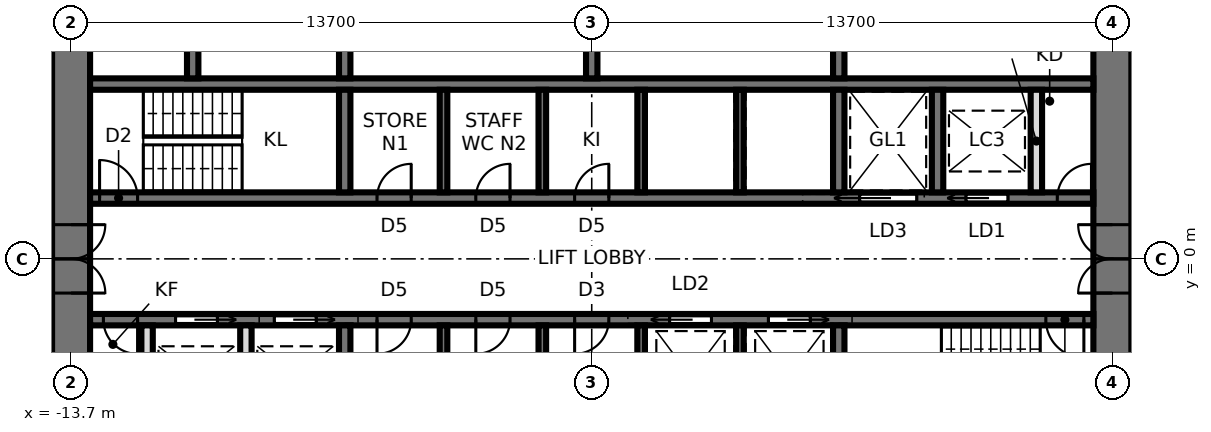
"""IFC4 building model, lengths in metres.
Left out: names, types, materials, properties, quantities, classifications, styles, units other than length and angle.
Written with IfcOpenShell. Run it as: python <this file> out.ifc"""

import sys

from ifc_helpers import new_model, si_unit, direction, frame, frame_2d, origin, place, context, subcontext, project, spatial, rectangle, extrude, element, fill, save


model = new_model("IFC4")
c1 = context("Model", 3, precision=1e-05, world=origin(), true_north=direction((0.0, 1.0)))
c2 = subcontext(c1, "Body", "Model", "MODEL_VIEW")
j1 = project(units=[si_unit("LENGTHUNIT", "METRE"), si_unit("PLANEANGLEUNIT", "RADIAN")], contexts=[c1])
p1 = place(None, origin())
s1 = spatial("IfcSite", under=j1, at=p1, CompositionType="ELEMENT")
p2 = place(p1, origin())
s2 = spatial("IfcBuilding", under=s1, at=p2, CompositionType="ELEMENT")
p3 = place(p2, frame((0.0, 0.0, 234.5)))
s3 = spatial("IfcBuildingStorey", under=s2, at=p3, CompositionType="ELEMENT", Elevation=234.5)
p4 = place(p3, frame((13.7, -9.5, 0.0), z_axis=(0.0, 0.0, 1.0), x_axis=(0.0, 1.0, 0.0)))
e1 = element("IfcWall", 1, at=p4, inside=s3, PredefinedType="SHEAR", context=c2, shape_type="SweptSolid", body=[
    extrude(rectangle(XDim=19.0, YDim=1.0, at=frame_2d((9.5, 0.0))), origin(), (0.0, 0.0, 1.0), 3.9),
])
p5 = place(p4, frame((8.6, 0.0, 0.0)))
e2 = element("IfcOpeningElement", 2, at=p5, cuts=e1, PredefinedType="OPENING", context=c2, shape_type="SweptSolid", body=[
    extrude(rectangle(XDim=1.8, YDim=2.4, at=frame_2d((0.9, 1.2))), frame((0.0, 0.51, 0.0), z_axis=(0.0, -1.0, 0.0), x_axis=(1.0, 0.0, 0.0)), (0.0, 0.0, 1.0), 1.02),
])
p6 = place(p3, frame((-13.7, 9.5, 0.0), z_axis=(0.0, 0.0, 1.0), x_axis=(0.0, -1.0, 0.0)))
e3 = element("IfcWall", 3, at=p6, inside=s3, PredefinedType="SHEAR", context=c2, shape_type="SweptSolid", body=[
    extrude(rectangle(XDim=19.0, YDim=1.0, at=frame_2d((9.5, 0.0))), origin(), (0.0, 0.0, 1.0), 3.9),
])
p7 = place(p6, frame((8.6, 0.0, 0.0)))
e4 = element("IfcOpeningElement", 4, at=p7, cuts=e3, PredefinedType="OPENING", context=c2, shape_type="SweptSolid", body=[
    extrude(rectangle(XDim=1.8, YDim=2.4, at=frame_2d((0.9, 1.2))), frame((0.0, 0.51, 0.0), z_axis=(0.0, -1.0, 0.0), x_axis=(1.0, 0.0, 0.0)), (0.0, 0.0, 1.0), 1.02),
])
p8 = place(p3, frame((-13.2, 1.6, 0.0), z_axis=(0.0, 0.0, 1.0), x_axis=(1.0, 0.0, 0.0)))
e5 = element("IfcWall", 5, at=p8, inside=s3, PredefinedType="SHEAR", context=c2, shape_type="SweptSolid", body=[
    extrude(rectangle(XDim=26.4, YDim=0.3, at=frame_2d((13.2, 0.0))), origin(), (0.0, 0.0, 1.0), 3.9),
])
p9 = place(p8, frame((0.25, 0.0, 0.0)))
e6 = element("IfcOpeningElement", 6, at=p9, cuts=e5, PredefinedType="OPENING", context=c2, shape_type="SweptSolid", body=[
    extrude(rectangle(XDim=1.0, YDim=2.1, at=frame_2d((0.5, 1.05))), frame((0.0, 0.16, 0.0), z_axis=(0.0, -1.0, 0.0), x_axis=(1.0, 0.0, 0.0)), (0.0, 0.0, 1.0), 0.32),
])
p10 = place(p8, frame((23.05, 0.0, 0.0)))
e7 = element("IfcOpeningElement", 7, at=p10, cuts=e5, PredefinedType="OPENING", context=c2, shape_type="SweptSolid", body=[
    extrude(rectangle(XDim=1.1, YDim=2.3, at=frame_2d((0.55, 1.15))), frame((0.0, 0.16, 0.0), z_axis=(0.0, -1.0, 0.0), x_axis=(1.0, 0.0, 0.0)), (0.0, 0.0, 1.0), 0.32),
])
p11 = place(p8, frame((20.25, 0.0, 0.0)))
e8 = element("IfcOpeningElement", 8, at=p11, cuts=e5, PredefinedType="OPENING", context=c2, shape_type="SweptSolid", body=[
    extrude(rectangle(XDim=1.5, YDim=2.4, at=frame_2d((0.75, 1.2))), frame((0.0, 0.16, 0.0), z_axis=(0.0, -1.0, 0.0), x_axis=(1.0, 0.0, 0.0)), (0.0, 0.0, 1.0), 0.32),
])
p12 = place(p8, frame((7.55, 0.0, 0.0)))
e9 = element("IfcOpeningElement", 9, at=p12, cuts=e5, PredefinedType="OPENING", context=c2, shape_type="SweptSolid", body=[
    extrude(rectangle(XDim=0.9, YDim=2.1, at=frame_2d((0.45, 1.05))), frame((0.0, 0.16, 0.0), z_axis=(0.0, -1.0, 0.0), x_axis=(1.0, 0.0, 0.0)), (0.0, 0.0, 1.0), 0.32),
])
p13 = place(p8, frame((10.15, 0.0, 0.0)))
e10 = element("IfcOpeningElement", 10, at=p13, cuts=e5, PredefinedType="OPENING", context=c2, shape_type="SweptSolid", body=[
    extrude(rectangle(XDim=0.9, YDim=2.1, at=frame_2d((0.45, 1.05))), frame((0.0, 0.16, 0.0), z_axis=(0.0, -1.0, 0.0), x_axis=(1.0, 0.0, 0.0)), (0.0, 0.0, 1.0), 0.32),
])
p14 = place(p8, frame((12.75, 0.0, 0.0)))
e11 = element("IfcOpeningElement", 11, at=p14, cuts=e5, PredefinedType="OPENING", context=c2, shape_type="SweptSolid", body=[
    extrude(rectangle(XDim=0.9, YDim=2.1, at=frame_2d((0.45, 1.05))), frame((0.0, 0.16, 0.0), z_axis=(0.0, -1.0, 0.0), x_axis=(1.0, 0.0, 0.0)), (0.0, 0.0, 1.0), 0.32),
])
p15 = place(p8, frame((25.45, 0.0, 0.0)))
e12 = element("IfcOpeningElement", 12, at=p15, cuts=e5, PredefinedType="OPENING", context=c2, shape_type="SweptSolid", body=[
    extrude(rectangle(XDim=0.9, YDim=2.1, at=frame_2d((0.45, 1.05))), frame((0.0, 0.16, 0.0), z_axis=(0.0, -1.0, 0.0), x_axis=(1.0, 0.0, 0.0)), (0.0, 0.0, 1.0), 0.32),
])
p16 = place(p3, frame((-13.2, -1.6, 0.0), z_axis=(0.0, 0.0, 1.0), x_axis=(1.0, 0.0, 0.0)))
e13 = element("IfcWall", 13, at=p16, inside=s3, PredefinedType="SHEAR", context=c2, shape_type="SweptSolid", body=[
    extrude(rectangle(XDim=26.4, YDim=0.3, at=frame_2d((13.2, 0.0))), origin(), (0.0, 0.0, 1.0), 3.9),
])
p17 = place(p16, frame((25.15, 0.0, 0.0)))
e14 = element("IfcOpeningElement", 14, at=p17, cuts=e13, PredefinedType="OPENING", context=c2, shape_type="SweptSolid", body=[
    extrude(rectangle(XDim=1.0, YDim=2.1, at=frame_2d((0.5, 1.05))), frame((0.0, 0.16, 0.0), z_axis=(0.0, -1.0, 0.0), x_axis=(1.0, 0.0, 0.0)), (0.0, 0.0, 1.0), 0.32),
])
p18 = place(p16, frame((7.55, 0.0, 0.0)))
e15 = element("IfcOpeningElement", 15, at=p18, cuts=e13, PredefinedType="OPENING", context=c2, shape_type="SweptSolid", body=[
    extrude(rectangle(XDim=0.9, YDim=2.1, at=frame_2d((0.45, 1.05))), frame((0.0, 0.16, 0.0), z_axis=(0.0, -1.0, 0.0), x_axis=(1.0, 0.0, 0.0)), (0.0, 0.0, 1.0), 0.32),
])
p19 = place(p16, frame((10.15, 0.0, 0.0)))
e16 = element("IfcOpeningElement", 16, at=p19, cuts=e13, PredefinedType="OPENING", context=c2, shape_type="SweptSolid", body=[
    extrude(rectangle(XDim=0.9, YDim=2.1, at=frame_2d((0.45, 1.05))), frame((0.0, 0.16, 0.0), z_axis=(0.0, -1.0, 0.0), x_axis=(1.0, 0.0, 0.0)), (0.0, 0.0, 1.0), 0.32),
])
p20 = place(p16, frame((12.75, 0.0, 0.0)))
e17 = element("IfcOpeningElement", 17, at=p20, cuts=e13, PredefinedType="OPENING", context=c2, shape_type="SweptSolid", body=[
    extrude(rectangle(XDim=0.9, YDim=2.1, at=frame_2d((0.45, 1.05))), frame((0.0, 0.16, 0.0), z_axis=(0.0, -1.0, 0.0), x_axis=(1.0, 0.0, 0.0)), (0.0, 0.0, 1.0), 0.32),
])
p21 = place(p16, frame((15.25, 0.0, 0.0)))
e18 = element("IfcOpeningElement", 18, at=p21, cuts=e13, PredefinedType="OPENING", context=c2, shape_type="SweptSolid", body=[
    extrude(rectangle(XDim=1.1, YDim=2.3, at=frame_2d((0.55, 1.15))), frame((0.0, 0.16, 0.0), z_axis=(0.0, -1.0, 0.0), x_axis=(1.0, 0.0, 0.0)), (0.0, 0.0, 1.0), 0.32),
])
p22 = place(p16, frame((17.85, 0.0, 0.0)))
e19 = element("IfcOpeningElement", 19, at=p22, cuts=e13, PredefinedType="OPENING", context=c2, shape_type="SweptSolid", body=[
    extrude(rectangle(XDim=1.1, YDim=2.3, at=frame_2d((0.55, 1.15))), frame((0.0, 0.16, 0.0), z_axis=(0.0, -1.0, 0.0), x_axis=(1.0, 0.0, 0.0)), (0.0, 0.0, 1.0), 0.32),
])
p23 = place(p16, frame((4.85, 0.0, 0.0)))
e20 = element("IfcOpeningElement", 20, at=p23, cuts=e13, PredefinedType="OPENING", context=c2, shape_type="SweptSolid", body=[
    extrude(rectangle(XDim=1.1, YDim=2.3, at=frame_2d((0.55, 1.15))), frame((0.0, 0.16, 0.0), z_axis=(0.0, -1.0, 0.0), x_axis=(1.0, 0.0, 0.0)), (0.0, 0.0, 1.0), 0.32),
])
p24 = place(p16, frame((2.25, 0.0, 0.0)))
e21 = element("IfcOpeningElement", 21, at=p24, cuts=e13, PredefinedType="OPENING", context=c2, shape_type="SweptSolid", body=[
    extrude(rectangle(XDim=1.1, YDim=2.3, at=frame_2d((0.55, 1.15))), frame((0.0, 0.16, 0.0), z_axis=(0.0, -1.0, 0.0), x_axis=(1.0, 0.0, 0.0)), (0.0, 0.0, 1.0), 0.32),
])
p25 = place(p16, frame((0.35, 0.0, 0.0)))
e22 = element("IfcOpeningElement", 22, at=p25, cuts=e13, PredefinedType="OPENING", context=c2, shape_type="SweptSolid", body=[
    extrude(rectangle(XDim=0.9, YDim=2.1, at=frame_2d((0.45, 1.05))), frame((0.0, 0.16, 0.0), z_axis=(0.0, -1.0, 0.0), x_axis=(1.0, 0.0, 0.0)), (0.0, 0.0, 1.0), 0.32),
])
p26 = place(p3, frame((-13.2, 4.6, 0.0), z_axis=(0.0, 0.0, 1.0), x_axis=(1.0, 0.0, 0.0)))
e23 = element("IfcWall", 23, at=p26, inside=s3, PredefinedType="SHEAR", context=c2, shape_type="SweptSolid", body=[
    extrude(rectangle(XDim=26.4, YDim=0.3, at=frame_2d((13.2, 0.0))), origin(), (0.0, 0.0, 1.0), 3.9),
])
p27 = place(p3, frame((-6.5, 1.75, 0.0), z_axis=(0.0, 0.0, 1.0), x_axis=(0.0, 1.0, 0.0)))
e24 = element("IfcWall", 24, at=p27, inside=s3, PredefinedType="SHEAR", context=c2, shape_type="SweptSolid", body=[
    extrude(rectangle(XDim=2.7, YDim=0.3, at=frame_2d((1.35, 0.0))), origin(), (0.0, 0.0, 1.0), 3.9),
])
p28 = place(p3, frame((-6.5, 4.75, 0.0), z_axis=(0.0, 0.0, 1.0), x_axis=(0.0, 1.0, 0.0)))
e25 = element("IfcWall", 25, at=p28, inside=s3, PredefinedType="SHEAR", context=c2, shape_type="SweptSolid", body=[
    extrude(rectangle(XDim=3.75, YDim=0.3, at=frame_2d((1.875, 0.0))), origin(), (0.0, 0.0, 1.0), 3.9),
])
p29 = place(p3, frame((6.5, 1.75, 0.0), z_axis=(0.0, 0.0, 1.0), x_axis=(0.0, 1.0, 0.0)))
e26 = element("IfcWall", 26, at=p29, inside=s3, PredefinedType="SHEAR", context=c2, shape_type="SweptSolid", body=[
    extrude(rectangle(XDim=2.7, YDim=0.3, at=frame_2d((1.35, 0.0))), origin(), (0.0, 0.0, 1.0), 3.9),
])
p30 = place(p3, frame((6.5, 4.75, 0.0), z_axis=(0.0, 0.0, 1.0), x_axis=(0.0, 1.0, 0.0)))
e27 = element("IfcWall", 27, at=p30, inside=s3, PredefinedType="SHEAR", context=c2, shape_type="SweptSolid", body=[
    extrude(rectangle(XDim=3.75, YDim=0.3, at=frame_2d((1.875, 0.0))), origin(), (0.0, 0.0, 1.0), 3.9),
])
for number, where, z_axis, x_axis in (
    (28, (-3.9, 1.75, 0.0), (0.0, 0.0, 1.0), (0.0, 1.0, 0.0)),
    (29, (-1.3, 1.75, 0.0), (0.0, 0.0, 1.0), (0.0, 1.0, 0.0)),
    (30, (1.3, 1.75, 0.0), (0.0, 0.0, 1.0), (0.0, 1.0, 0.0)),
    (31, (3.9, 1.75, 0.0), (0.0, 0.0, 1.0), (0.0, 1.0, 0.0)),
):
    element("IfcWall", number, at=place(p3, frame(where, z_axis=z_axis, x_axis=x_axis)), inside=s3, PredefinedType="SHEAR", context=c2, shape_type="SweptSolid", body=[
        extrude(rectangle(XDim=2.7, YDim=0.2, at=frame_2d((1.35, 0.0))), origin(), (0.0, 0.0, 1.0), 3.9),
    ])
p31 = place(p3, frame((0.0, 4.75, 0.0), z_axis=(0.0, 0.0, 1.0), x_axis=(0.0, 1.0, 0.0)))
e32 = element("IfcWall", 32, at=p31, inside=s3, PredefinedType="SHEAR", context=c2, shape_type="SweptSolid", body=[
    extrude(rectangle(XDim=3.75, YDim=0.3, at=frame_2d((1.875, 0.0))), origin(), (0.0, 0.0, 1.0), 3.9),
])
for number, where, z_axis, x_axis in (
    (33, (-6.5, -1.75, 0.0), (0.0, 0.0, 1.0), (0.0, -1.0, 0.0)),
    (34, (6.5, -1.75, 0.0), (0.0, 0.0, 1.0), (0.0, -1.0, 0.0)),
):
    element("IfcWall", number, at=place(p3, frame(where, z_axis=z_axis, x_axis=x_axis)), inside=s3, PredefinedType="SHEAR", context=c2, shape_type="SweptSolid", body=[
        extrude(rectangle(XDim=2.7, YDim=0.3, at=frame_2d((1.35, 0.0))), origin(), (0.0, 0.0, 1.0), 3.9),
    ])
for number, where, z_axis, x_axis in (
    (35, (-3.9, -1.75, 0.0), (0.0, 0.0, 1.0), (0.0, -1.0, 0.0)),
    (36, (-1.3, -1.75, 0.0), (0.0, 0.0, 1.0), (0.0, -1.0, 0.0)),
    (37, (1.3, -1.75, 0.0), (0.0, 0.0, 1.0), (0.0, -1.0, 0.0)),
    (38, (3.9, -1.75, 0.0), (0.0, 0.0, 1.0), (0.0, -1.0, 0.0)),
):
    element("IfcWall", number, at=place(p3, frame(where, z_axis=z_axis, x_axis=x_axis)), inside=s3, PredefinedType="SHEAR", context=c2, shape_type="SweptSolid", body=[
        extrude(rectangle(XDim=2.7, YDim=0.2, at=frame_2d((1.35, 0.0))), origin(), (0.0, 0.0, 1.0), 3.9),
    ])
p32 = place(p3, frame((-10.5, 4.75, 0.0), z_axis=(0.0, 0.0, 1.0), x_axis=(0.0, 1.0, 0.0)))
e39 = element("IfcWall", 39, at=p32, inside=s3, PredefinedType="SHEAR", context=c2, shape_type="SweptSolid", body=[
    extrude(rectangle(XDim=3.75, YDim=0.3, at=frame_2d((1.875, 0.0))), origin(), (0.0, 0.0, 1.0), 3.9),
])
p33 = place(p3, frame((9.1, 1.75, 0.0), z_axis=(0.0, 0.0, 1.0), x_axis=(0.0, 1.0, 0.0)))
e40 = element("IfcWall", 40, at=p33, inside=s3, PredefinedType="SHEAR", context=c2, shape_type="SweptSolid", body=[
    extrude(rectangle(XDim=2.7, YDim=0.3, at=frame_2d((1.35, 0.0))), origin(), (0.0, 0.0, 1.0), 3.9),
])
for number, where, z_axis, x_axis in (
    (41, (-9.1, -1.75, 0.0), (0.0, 0.0, 1.0), (0.0, -1.0, 0.0)),
    (42, (-11.7, -1.75, 0.0), (0.0, 0.0, 1.0), (0.0, -1.0, 0.0)),
    (43, (11.7, 1.75, 0.0), (0.0, 0.0, 1.0), (0.0, 1.0, 0.0)),
):
    element("IfcWall", number, at=place(p3, frame(where, z_axis=z_axis, x_axis=x_axis)), inside=s3, PredefinedType="SOLIDWALL", context=c2, shape_type="SweptSolid", body=[
        extrude(rectangle(XDim=2.7, YDim=0.3, at=frame_2d((1.35, 0.0))), origin(), (0.0, 0.0, 1.0), 3.74),
    ])
p34 = place(p7, origin())
e44 = element("IfcDoor", 44, at=p34, inside=s3, OperationType="DOUBLE_DOOR_SINGLE_SWING", PredefinedType="DOOR", context=c2, shape_type="SweptSolid", body=[
    extrude(rectangle(XDim=1.72, YDim=2.36, at=frame_2d((0.9, 1.18))), frame((0.0, 0.025, 0.0), z_axis=(0.0, -1.0, 0.0), x_axis=(1.0, 0.0, 0.0)), (0.0, 0.0, 1.0), 0.05),
    extrude(rectangle(XDim=0.04, YDim=2.4, at=frame_2d((0.02, 1.2))), frame((0.0, 0.25, 0.0), z_axis=(0.0, -1.0, 0.0), x_axis=(1.0, 0.0, 0.0)), (0.0, 0.0, 1.0), 0.5),
    extrude(rectangle(XDim=0.04, YDim=2.4, at=frame_2d((1.78, 1.2))), frame((0.0, 0.25, 0.0), z_axis=(0.0, -1.0, 0.0), x_axis=(1.0, 0.0, 0.0)), (0.0, 0.0, 1.0), 0.5),
    extrude(rectangle(XDim=1.72, YDim=0.04, at=frame_2d((0.9, 2.38))), frame((0.0, 0.25, 0.0), z_axis=(0.0, -1.0, 0.0), x_axis=(1.0, 0.0, 0.0)), (0.0, 0.0, 1.0), 0.5),
])
fill(e4, e44)
p35 = place(p5, origin())
e45 = element("IfcDoor", 45, at=p35, inside=s3, OperationType="DOUBLE_DOOR_SINGLE_SWING", PredefinedType="DOOR", context=c2, shape_type="SweptSolid", body=[
    extrude(rectangle(XDim=1.72, YDim=2.36, at=frame_2d((0.9, 1.18))), frame((0.0, 0.025, 0.0), z_axis=(0.0, -1.0, 0.0), x_axis=(1.0, 0.0, 0.0)), (0.0, 0.0, 1.0), 0.05),
    extrude(rectangle(XDim=0.04, YDim=2.4, at=frame_2d((0.02, 1.2))), frame((0.0, 0.25, 0.0), z_axis=(0.0, -1.0, 0.0), x_axis=(1.0, 0.0, 0.0)), (0.0, 0.0, 1.0), 0.5),
    extrude(rectangle(XDim=0.04, YDim=2.4, at=frame_2d((1.78, 1.2))), frame((0.0, 0.25, 0.0), z_axis=(0.0, -1.0, 0.0), x_axis=(1.0, 0.0, 0.0)), (0.0, 0.0, 1.0), 0.5),
    extrude(rectangle(XDim=1.72, YDim=0.04, at=frame_2d((0.9, 2.38))), frame((0.0, 0.25, 0.0), z_axis=(0.0, -1.0, 0.0), x_axis=(1.0, 0.0, 0.0)), (0.0, 0.0, 1.0), 0.5),
])
fill(e2, e45)
p36 = place(p9, origin())
e46 = element("IfcDoor", 46, at=p36, inside=s3, OperationType="SINGLE_SWING_LEFT", PredefinedType="DOOR", context=c2, shape_type="SweptSolid", body=[
    extrude(rectangle(XDim=1.0, YDim=2.1, at=frame_2d((0.5, 1.05))), frame((0.0, 0.025, 0.0), z_axis=(0.0, -1.0, 0.0), x_axis=(1.0, 0.0, 0.0)), (0.0, 0.0, 1.0), 0.05),
])
fill(e6, e46)
p37 = place(p17, frame((1.0, 0.0, 0.0), z_axis=(0.0, 0.0, 1.0), x_axis=(-1.0, 0.0, 0.0)))
e47 = element("IfcDoor", 47, at=p37, inside=s3, OperationType="SINGLE_SWING_LEFT", PredefinedType="DOOR", context=c2, shape_type="SweptSolid", body=[
    extrude(rectangle(XDim=1.0, YDim=2.1, at=frame_2d((0.5, 1.05))), frame((0.0, 0.025, 0.0), z_axis=(0.0, -1.0, 0.0), x_axis=(1.0, 0.0, 0.0)), (0.0, 0.0, 1.0), 0.05),
])
fill(e14, e47)
p38 = place(p10, origin())
e48 = element("IfcDoor", 48, at=p38, inside=s3, OperationType="SLIDING_TO_LEFT", PredefinedType="DOOR", context=c2, shape_type="SweptSolid", body=[
    extrude(rectangle(XDim=1.1, YDim=2.3, at=frame_2d((0.55, 1.15))), frame((0.0, 0.025, 0.0), z_axis=(0.0, -1.0, 0.0), x_axis=(1.0, 0.0, 0.0)), (0.0, 0.0, 1.0), 0.05),
])
fill(e7, e48)
p39 = place(p11, origin())
e49 = element("IfcDoor", 49, at=p39, inside=s3, OperationType="SLIDING_TO_LEFT", PredefinedType="DOOR", context=c2, shape_type="SweptSolid", body=[
    extrude(rectangle(XDim=1.5, YDim=2.4, at=frame_2d((0.75, 1.2))), frame((0.0, 0.025, 0.0), z_axis=(0.0, -1.0, 0.0), x_axis=(1.0, 0.0, 0.0)), (0.0, 0.0, 1.0), 0.05),
])
fill(e8, e49)
p40 = place(p12, origin())
e50 = element("IfcDoor", 50, at=p40, inside=s3, OperationType="SINGLE_SWING_RIGHT", PredefinedType="DOOR", context=c2, shape_type="SweptSolid", body=[
    extrude(rectangle(XDim=0.9, YDim=2.1, at=frame_2d((0.45, 1.05))), frame((0.0, 0.025, 0.0), z_axis=(0.0, -1.0, 0.0), x_axis=(1.0, 0.0, 0.0)), (0.0, 0.0, 1.0), 0.05),
])
fill(e9, e50)
p41 = place(p13, origin())
e51 = element("IfcDoor", 51, at=p41, inside=s3, OperationType="SINGLE_SWING_RIGHT", PredefinedType="DOOR", context=c2, shape_type="SweptSolid", body=[
    extrude(rectangle(XDim=0.9, YDim=2.1, at=frame_2d((0.45, 1.05))), frame((0.0, 0.025, 0.0), z_axis=(0.0, -1.0, 0.0), x_axis=(1.0, 0.0, 0.0)), (0.0, 0.0, 1.0), 0.05),
])
fill(e10, e51)
p42 = place(p14, origin())
e52 = element("IfcDoor", 52, at=p42, inside=s3, OperationType="SINGLE_SWING_RIGHT", PredefinedType="DOOR", context=c2, shape_type="SweptSolid", body=[
    extrude(rectangle(XDim=0.9, YDim=2.1, at=frame_2d((0.45, 1.05))), frame((0.0, 0.025, 0.0), z_axis=(0.0, -1.0, 0.0), x_axis=(1.0, 0.0, 0.0)), (0.0, 0.0, 1.0), 0.05),
])
fill(e11, e52)
p43 = place(p18, frame((0.9, 0.0, 0.0), z_axis=(0.0, 0.0, 1.0), x_axis=(-1.0, 0.0, 0.0)))
e53 = element("IfcDoor", 53, at=p43, inside=s3, OperationType="SINGLE_SWING_RIGHT", PredefinedType="DOOR", context=c2, shape_type="SweptSolid", body=[
    extrude(rectangle(XDim=0.9, YDim=2.1, at=frame_2d((0.45, 1.05))), frame((0.0, 0.025, 0.0), z_axis=(0.0, -1.0, 0.0), x_axis=(1.0, 0.0, 0.0)), (0.0, 0.0, 1.0), 0.05),
])
fill(e15, e53)
p44 = place(p19, frame((0.9, 0.0, 0.0), z_axis=(0.0, 0.0, 1.0), x_axis=(-1.0, 0.0, 0.0)))
e54 = element("IfcDoor", 54, at=p44, inside=s3, OperationType="SINGLE_SWING_RIGHT", PredefinedType="DOOR", context=c2, shape_type="SweptSolid", body=[
    extrude(rectangle(XDim=0.9, YDim=2.1, at=frame_2d((0.45, 1.05))), frame((0.0, 0.025, 0.0), z_axis=(0.0, -1.0, 0.0), x_axis=(1.0, 0.0, 0.0)), (0.0, 0.0, 1.0), 0.05),
])
fill(e16, e54)
p45 = place(p20, frame((0.9, 0.0, 0.0), z_axis=(0.0, 0.0, 1.0), x_axis=(-1.0, 0.0, 0.0)))
e55 = element("IfcDoor", 55, at=p45, inside=s3, OperationType="SINGLE_SWING_RIGHT", PredefinedType="DOOR", context=c2, shape_type="SweptSolid", body=[
    extrude(rectangle(XDim=0.9, YDim=2.1, at=frame_2d((0.45, 1.05))), frame((0.0, 0.025, 0.0), z_axis=(0.0, -1.0, 0.0), x_axis=(1.0, 0.0, 0.0)), (0.0, 0.0, 1.0), 0.05),
])
fill(e17, e55)
p46 = place(p21, frame((1.1, 0.0, 0.0), z_axis=(0.0, 0.0, 1.0), x_axis=(-1.0, 0.0, 0.0)))
e56 = element("IfcDoor", 56, at=p46, inside=s3, OperationType="SLIDING_TO_RIGHT", PredefinedType="DOOR", context=c2, shape_type="SweptSolid", body=[
    extrude(rectangle(XDim=1.1, YDim=2.3, at=frame_2d((0.55, 1.15))), frame((0.0, 0.025, 0.0), z_axis=(0.0, -1.0, 0.0), x_axis=(1.0, 0.0, 0.0)), (0.0, 0.0, 1.0), 0.05),
])
fill(e18, e56)
p47 = place(p22, frame((1.1, 0.0, 0.0), z_axis=(0.0, 0.0, 1.0), x_axis=(-1.0, 0.0, 0.0)))
e57 = element("IfcDoor", 57, at=p47, inside=s3, OperationType="SLIDING_TO_LEFT", PredefinedType="DOOR", context=c2, shape_type="SweptSolid", body=[
    extrude(rectangle(XDim=1.1, YDim=2.3, at=frame_2d((0.55, 1.15))), frame((0.0, 0.025, 0.0), z_axis=(0.0, -1.0, 0.0), x_axis=(1.0, 0.0, 0.0)), (0.0, 0.0, 1.0), 0.05),
])
fill(e19, e57)
p48 = place(p23, frame((1.1, 0.0, 0.0), z_axis=(0.0, 0.0, 1.0), x_axis=(-1.0, 0.0, 0.0)))
e58 = element("IfcDoor", 58, at=p48, inside=s3, OperationType="SLIDING_TO_LEFT", PredefinedType="DOOR", context=c2, shape_type="SweptSolid", body=[
    extrude(rectangle(XDim=1.1, YDim=2.3, at=frame_2d((0.55, 1.15))), frame((0.0, 0.025, 0.0), z_axis=(0.0, -1.0, 0.0), x_axis=(1.0, 0.0, 0.0)), (0.0, 0.0, 1.0), 0.05),
])
fill(e20, e58)
p49 = place(p24, frame((1.1, 0.0, 0.0), z_axis=(0.0, 0.0, 1.0), x_axis=(-1.0, 0.0, 0.0)))
e59 = element("IfcDoor", 59, at=p49, inside=s3, OperationType="SLIDING_TO_LEFT", PredefinedType="DOOR", context=c2, shape_type="SweptSolid", body=[
    extrude(rectangle(XDim=1.1, YDim=2.3, at=frame_2d((0.55, 1.15))), frame((0.0, 0.025, 0.0), z_axis=(0.0, -1.0, 0.0), x_axis=(1.0, 0.0, 0.0)), (0.0, 0.0, 1.0), 0.05),
])
fill(e21, e59)
p50 = place(p15, origin())
e60 = element("IfcDoor", 60, at=p50, inside=s3, OperationType="SINGLE_SWING_RIGHT", PredefinedType="DOOR", context=c2, shape_type="SweptSolid", body=[
    extrude(rectangle(XDim=0.9, YDim=2.1, at=frame_2d((0.45, 1.05))), frame((0.0, 0.025, 0.0), z_axis=(0.0, -1.0, 0.0), x_axis=(1.0, 0.0, 0.0)), (0.0, 0.0, 1.0), 0.05),
])
fill(e12, e60)
p51 = place(p25, frame((0.9, 0.0, 0.0), z_axis=(0.0, 0.0, 1.0), x_axis=(-1.0, 0.0, 0.0)))
e61 = element("IfcDoor", 61, at=p51, inside=s3, OperationType="SINGLE_SWING_LEFT", PredefinedType="DOOR", context=c2, shape_type="SweptSolid", body=[
    extrude(rectangle(XDim=0.9, YDim=2.1, at=frame_2d((0.45, 1.05))), frame((0.0, 0.025, 0.0), z_axis=(0.0, -1.0, 0.0), x_axis=(1.0, 0.0, 0.0)), (0.0, 0.0, 1.0), 0.05),
])
fill(e22, e61)
save(model, sys.argv[1])
